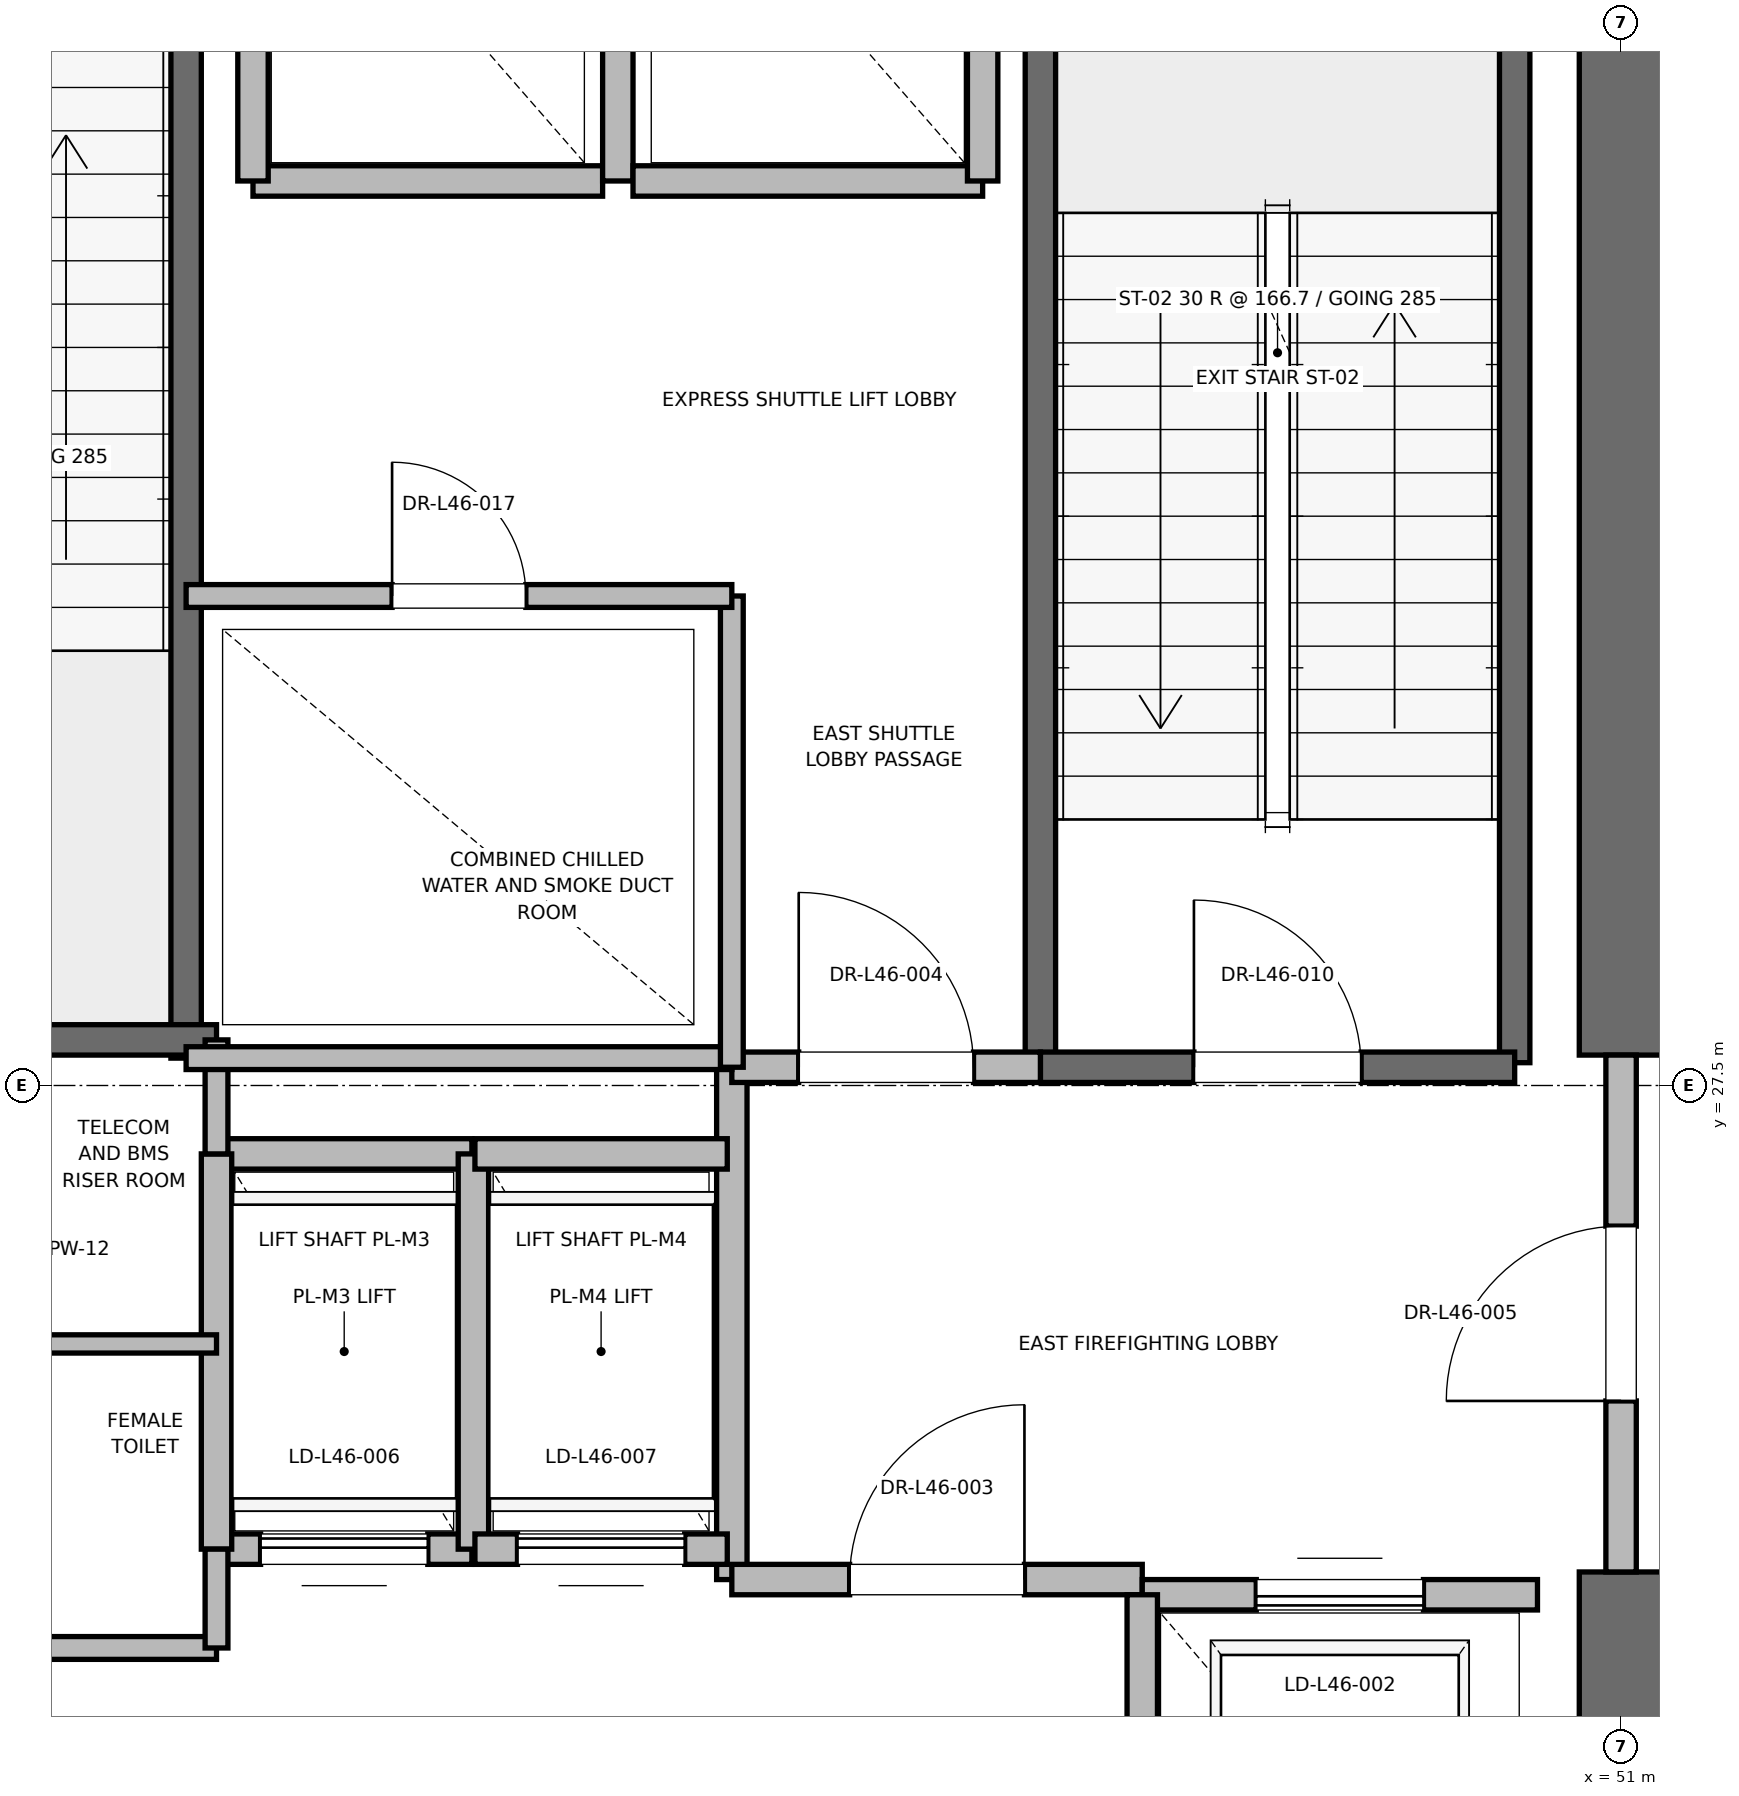
"""IFC4 building model, lengths in metres.
Left out: names, types, materials, properties, quantities, classifications, styles, units other than length and angle.
Written with IfcOpenShell. Run it as: python <this file> out.ifc"""

import sys

from ifc_helpers import new_model, si_unit, direction, frame, frame_2d, origin, place, context, subcontext, project, spatial, rectangle, extrude, element, fill, save


model = new_model("IFC4")
c1 = context("Model", 3, precision=1e-05, world=origin(), true_north=direction((0.0, 1.0)))
c2 = subcontext(c1, "Body", "Model", "MODEL_VIEW")
j1 = project(units=[si_unit("LENGTHUNIT", "METRE"), si_unit("PLANEANGLEUNIT", "RADIAN")], contexts=[c1])
p1 = place(None, origin())
s1 = spatial("IfcSite", under=j1, at=p1, CompositionType="ELEMENT")
p2 = place(p1, origin())
s2 = spatial("IfcBuilding", under=s1, at=p2, CompositionType="ELEMENT")
p3 = place(p2, frame((0.0, 0.0, 200.2)))
s3 = spatial("IfcBuildingStorey", under=s2, at=p3, CompositionType="ELEMENT", Elevation=200.2)
p4 = place(p3, frame((51.0, 18.5, 0.0), z_axis=(0.0, 0.0, 1.0), x_axis=(0.0, 1.0, 0.0)))
e1 = element("IfcWall", 1, at=p4, inside=s3, PredefinedType="SHEAR", context=c2, shape_type="SweptSolid", body=[
    extrude(rectangle(XDim=5.8, YDim=0.55, at=frame_2d((2.9, 0.0))), origin(), (0.0, 0.0, 1.0), 4.775),
])
p5 = place(p3, frame((51.0, 27.7, 0.0), z_axis=(0.0, 0.0, 1.0), x_axis=(0.0, 1.0, 0.0)))
e2 = element("IfcWall", 2, at=p5, inside=s3, PredefinedType="SHEAR", context=c2, shape_type="SweptSolid", body=[
    extrude(rectangle(XDim=8.8, YDim=0.55, at=frame_2d((4.4, 0.0))), origin(), (0.0, 0.0, 1.0), 4.775),
])
p6 = place(p3, frame((50.3, 27.65, 0.0), z_axis=(0.0, 0.0, 1.0), x_axis=(0.0, 1.0, 0.0)))
e3 = element("IfcWall", 3, at=p6, inside=s3, PredefinedType="SOLIDWALL", context=c2, shape_type="SweptSolid", body=[
    extrude(rectangle(XDim=8.15, YDim=0.2, at=frame_2d((4.075, 0.0))), origin(), (0.0, 0.0, 1.0), 4.775),
])
p7 = place(p3, frame((47.18, 27.62, 0.0), z_axis=(0.0, 0.0, 1.0), x_axis=(0.0, 1.0, 0.0)))
e4 = element("IfcWall", 4, at=p7, inside=s3, PredefinedType="SOLIDWALL", context=c2, shape_type="SweptSolid", body=[
    extrude(rectangle(XDim=8.18, YDim=0.2, at=frame_2d((4.09, 0.0))), origin(), (0.0, 0.0, 1.0), 4.775),
])
p8 = place(p3, frame((47.18, 27.62, 0.0), z_axis=(0.0, 0.0, 1.0), x_axis=(1.0, 0.0, 0.0)))
e5 = element("IfcWall", 5, at=p8, inside=s3, PredefinedType="SOLIDWALL", context=c2, shape_type="SweptSolid", body=[
    extrude(rectangle(XDim=3.12, YDim=0.2, at=frame_2d((1.56, 0.0))), origin(), (0.0, 0.0, 1.0), 4.775),
])
p9 = place(p8, frame((1.01, 0.0, 0.0)))
e6 = element("IfcOpeningElement", 6, at=p9, cuts=e5, PredefinedType="OPENING", context=c2, shape_type="SweptSolid", body=[
    extrude(rectangle(XDim=1.1, YDim=2.15, at=frame_2d((0.55, 1.075))), frame((0.0, 0.1, 0.0), z_axis=(0.0, -1.0, 0.0), x_axis=(1.0, 0.0, 0.0)), (0.0, 0.0, 1.0), 0.2),
])
p10 = place(p3, frame((41.56, 27.68, 0.0), z_axis=(0.0, 0.0, 1.0), x_axis=(0.0, 1.0, 0.0)))
e7 = element("IfcWall", 7, at=p10, inside=s3, PredefinedType="SOLIDWALL", context=c2, shape_type="SweptSolid", body=[
    extrude(rectangle(XDim=8.57, YDim=0.2, at=frame_2d((4.285, 0.0))), origin(), (0.0, 0.0, 1.0), 4.775),
])
p11 = place(p3, frame((38.44, 27.8, 0.0), z_axis=(0.0, 0.0, 1.0), x_axis=(1.0, 0.0, 0.0)))
e8 = element("IfcWall", 8, at=p11, inside=s3, PredefinedType="SOLIDWALL", context=c2, shape_type="SweptSolid", body=[
    extrude(rectangle(XDim=3.32, YDim=0.2, at=frame_2d((1.66, 0.0))), origin(), (0.0, 0.0, 1.0), 4.775),
])
p12 = place(p3, frame((45.15, 24.25, 0.0), z_axis=(0.0, 0.0, 1.0), x_axis=(0.0, 1.0, 0.0)))
e9 = element("IfcWall", 9, at=p12, inside=s3, PredefinedType="PARTITIONING", context=c2, shape_type="SweptSolid", body=[
    extrude(rectangle(XDim=3.37, YDim=0.2, at=frame_2d((1.685, 0.0))), origin(), (0.0, 0.0, 1.0), 4.775),
])
p13 = place(p3, frame((45.15, 24.25, 0.0), z_axis=(0.0, 0.0, 1.0), x_axis=(1.0, 0.0, 0.0)))
e10 = element("IfcWall", 10, at=p13, inside=s3, PredefinedType="PARTITIONING", context=c2, shape_type="SweptSolid", body=[
    extrude(rectangle(XDim=2.7, YDim=0.2, at=frame_2d((1.35, 0.0))), origin(), (0.0, 0.0, 1.0), 4.775),
])
p14 = place(p13, frame((0.775, 0.0, 0.0)))
e11 = element("IfcOpeningElement", 11, at=p14, cuts=e10, PredefinedType="OPENING", context=c2, shape_type="SweptSolid", body=[
    extrude(rectangle(XDim=1.15, YDim=2.2, at=frame_2d((0.575, 1.1))), frame((0.0, 0.1, 0.0), z_axis=(0.0, -1.0, 0.0), x_axis=(1.0, 0.0, 0.0)), (0.0, 0.0, 1.0), 0.2),
])
p15 = place(p3, frame((45.15, 27.62, 0.0), z_axis=(0.0, 0.0, 1.0), x_axis=(1.0, 0.0, 0.0)))
e12 = element("IfcWall", 12, at=p15, inside=s3, PredefinedType="PARTITIONING", context=c2, shape_type="SweptSolid", body=[
    extrude(rectangle(XDim=2.03, YDim=0.2, at=frame_2d((1.015, 0.0))), origin(), (0.0, 0.0, 1.0), 4.775),
])
p16 = place(p15, frame((0.44, 0.0, 0.0)))
e13 = element("IfcOpeningElement", 13, at=p16, cuts=e12, PredefinedType="OPENING", context=c2, shape_type="SweptSolid", body=[
    extrude(rectangle(XDim=1.15, YDim=2.2, at=frame_2d((0.575, 1.1))), frame((0.0, 0.1, 0.0), z_axis=(0.0, -1.0, 0.0), x_axis=(1.0, 0.0, 0.0)), (0.0, 0.0, 1.0), 0.2),
])
p17 = place(p3, frame((51.0, 24.3, 0.0), z_axis=(0.0, 0.0, 1.0), x_axis=(0.0, 1.0, 0.0)))
e14 = element("IfcWall", 14, at=p17, inside=s3, PredefinedType="PARTITIONING", context=c2, shape_type="SweptSolid", body=[
    extrude(rectangle(XDim=3.4, YDim=0.2, at=frame_2d((1.7, 0.0))), origin(), (0.0, 0.0, 1.0), 3.755),
])
p18 = place(p17, frame((1.125, 0.0, 0.0)))
e15 = element("IfcOpeningElement", 15, at=p18, cuts=e14, PredefinedType="OPENING", context=c2, shape_type="SweptSolid", body=[
    extrude(rectangle(XDim=1.15, YDim=2.2, at=frame_2d((0.575, 1.1))), frame((0.0, 0.1, 0.0), z_axis=(0.0, -1.0, 0.0), x_axis=(1.0, 0.0, 0.0)), (0.0, 0.0, 1.0), 0.2),
])
p19 = place(p3, frame((50.45, 24.15, 0.0), z_axis=(0.0, 0.0, 1.0), x_axis=(-1.0, 0.0, 0.0)))
e16 = element("IfcWall", 16, at=p19, inside=s3, PredefinedType="SOLIDWALL", context=c2, shape_type="SweptSolid", body=[
    extrude(rectangle(XDim=2.6, YDim=0.2, at=frame_2d((1.3, 0.0))), origin(), (0.0, 0.0, 1.0), 3.755),
])
p20 = place(p19, frame((0.75, 0.0, 0.0)))
e17 = element("IfcOpeningElement", 17, at=p20, cuts=e16, PredefinedType="OPENING", context=c2, shape_type="SweptSolid", body=[
    extrude(rectangle(XDim=1.1, YDim=2.2, at=frame_2d((0.55, 1.1))), frame((0.0, 0.1, 0.0), z_axis=(0.0, -1.0, 0.0), x_axis=(1.0, 0.0, 0.0)), (0.0, 0.0, 1.0), 0.2),
])
p21 = place(p3, frame((47.85, 24.15, 0.0), z_axis=(0.0, 0.0, 1.0), x_axis=(0.0, -1.0, 0.0)))
e18 = element("IfcWall", 18, at=p21, inside=s3, PredefinedType="SOLIDWALL", context=c2, shape_type="SweptSolid", body=[
    extrude(rectangle(XDim=3.0, YDim=0.2, at=frame_2d((1.5, 0.0))), origin(), (0.0, 0.0, 1.0), 4.775),
])
p22 = place(p3, frame((41.76, 24.45, 0.0), z_axis=(0.0, 0.0, 1.0), x_axis=(1.0, 0.0, 0.0)))
e19 = element("IfcWall", 19, at=p22, inside=s3, PredefinedType="SOLIDWALL", context=c2, shape_type="SweptSolid", body=[
    extrude(rectangle(XDim=1.68, YDim=0.2, at=frame_2d((0.84, 0.0))), origin(), (0.0, 0.0, 1.0), 4.775),
])
p23 = place(p22, frame((0.29, 0.0, 0.0)))
e20 = element("IfcOpeningElement", 20, at=p23, cuts=e19, PredefinedType="OPENING", context=c2, shape_type="SweptSolid", body=[
    extrude(rectangle(XDim=1.1, YDim=2.2, at=frame_2d((0.55, 1.1))), frame((0.0, 0.1, 0.0), z_axis=(0.0, -1.0, 0.0), x_axis=(1.0, 0.0, 0.0)), (0.0, 0.0, 1.0), 0.2),
])
p24 = place(p3, frame((43.44, 27.05, 0.0), z_axis=(0.0, 0.0, 1.0), x_axis=(-1.0, 0.0, 0.0)))
e21 = element("IfcWall", 21, at=p24, inside=s3, PredefinedType="SOLIDWALL", context=c2, shape_type="SweptSolid", body=[
    extrude(rectangle(XDim=1.68, YDim=0.2, at=frame_2d((0.84, 0.0))), origin(), (0.0, 0.0, 1.0), 4.775),
])
for number, where, z_axis, x_axis in (
    (22, (41.76, 27.05, 0.0), (0.0, 0.0, 1.0), (0.0, -1.0, 0.0)),
    (23, (43.45, 24.45, 0.0), (0.0, 0.0, 1.0), (0.0, 1.0, 0.0)),
):
    element("IfcWall", number, at=place(p3, frame(where, z_axis=z_axis, x_axis=x_axis)), inside=s3, PredefinedType="SOLIDWALL", context=c2, shape_type="SweptSolid", body=[
        extrude(rectangle(XDim=2.6, YDim=0.2, at=frame_2d((1.3, 0.0))), origin(), (0.0, 0.0, 1.0), 4.775),
    ])
p25 = place(p3, frame((43.46, 24.45, 0.0), z_axis=(0.0, 0.0, 1.0), x_axis=(1.0, 0.0, 0.0)))
e24 = element("IfcWall", 24, at=p25, inside=s3, PredefinedType="SOLIDWALL", context=c2, shape_type="SweptSolid", body=[
    extrude(rectangle(XDim=1.66, YDim=0.2, at=frame_2d((0.83, 0.0))), origin(), (0.0, 0.0, 1.0), 4.775),
])
p26 = place(p25, frame((0.28, 0.0, 0.0)))
e25 = element("IfcOpeningElement", 25, at=p26, cuts=e24, PredefinedType="OPENING", context=c2, shape_type="SweptSolid", body=[
    extrude(rectangle(XDim=1.1, YDim=2.2, at=frame_2d((0.55, 1.1))), frame((0.0, 0.1, 0.0), z_axis=(0.0, -1.0, 0.0), x_axis=(1.0, 0.0, 0.0)), (0.0, 0.0, 1.0), 0.2),
])
p27 = place(p3, frame((45.12, 27.05, 0.0), z_axis=(0.0, 0.0, 1.0), x_axis=(-1.0, 0.0, 0.0)))
e26 = element("IfcWall", 26, at=p27, inside=s3, PredefinedType="SOLIDWALL", context=c2, shape_type="SweptSolid", body=[
    extrude(rectangle(XDim=1.66, YDim=0.2, at=frame_2d((0.83, 0.0))), origin(), (0.0, 0.0, 1.0), 4.775),
])
p28 = place(p3, frame((42.0, 33.45, 0.0), z_axis=(0.0, 0.0, 1.0), x_axis=(1.0, 0.0, 0.0)))
e27 = element("IfcWall", 27, at=p28, inside=s3, PredefinedType="SOLIDWALL", context=c2, shape_type="SweptSolid", body=[
    extrude(rectangle(XDim=2.3, YDim=0.2, at=frame_2d((1.15, 0.0))), origin(), (0.0, 0.0, 1.0), 4.775),
])
for number, where, z_axis, x_axis in (
    (28, (42.0, 36.05, 0.0), (0.0, 0.0, 1.0), (0.0, -1.0, 0.0)),
    (29, (44.4, 33.45, 0.0), (0.0, 0.0, 1.0), (0.0, 1.0, 0.0)),
):
    element("IfcWall", number, at=place(p3, frame(where, z_axis=z_axis, x_axis=x_axis)), inside=s3, PredefinedType="SOLIDWALL", context=c2, shape_type="SweptSolid", body=[
        extrude(rectangle(XDim=2.6, YDim=0.2, at=frame_2d((1.3, 0.0))), origin(), (0.0, 0.0, 1.0), 3.755),
    ])
p29 = place(p3, frame((44.5, 33.45, 0.0), z_axis=(0.0, 0.0, 1.0), x_axis=(1.0, 0.0, 0.0)))
e30 = element("IfcWall", 30, at=p29, inside=s3, PredefinedType="SOLIDWALL", context=c2, shape_type="SweptSolid", body=[
    extrude(rectangle(XDim=2.3, YDim=0.2, at=frame_2d((1.15, 0.0))), origin(), (0.0, 0.0, 1.0), 4.775),
])
p30 = place(p3, frame((46.8, 33.45, 0.0), z_axis=(0.0, 0.0, 1.0), x_axis=(0.0, 1.0, 0.0)))
e31 = element("IfcWall", 31, at=p30, inside=s3, PredefinedType="SOLIDWALL", context=c2, shape_type="SweptSolid", body=[
    extrude(rectangle(XDim=2.6, YDim=0.2, at=frame_2d((1.3, 0.0))), origin(), (0.0, 0.0, 1.0), 4.775),
])
p31 = place(p3, frame((39.95, 23.8, 0.0), z_axis=(0.0, 0.0, 1.0), x_axis=(1.0, 0.0, 0.0)))
e32 = element("IfcWall", 32, at=p31, inside=s3, PredefinedType="PARTITIONING", context=c2, shape_type="SweptSolid", body=[
    extrude(rectangle(XDim=1.81, YDim=0.15, at=frame_2d((0.905, 0.0))), origin(), (0.0, 0.0, 1.0), 2.85),
])
p32 = place(p3, frame((39.95, 25.8, 0.0), z_axis=(0.0, 0.0, 1.0), x_axis=(1.0, 0.0, 0.0)))
e33 = element("IfcWall", 33, at=p32, inside=s3, PredefinedType="PARTITIONING", context=c2, shape_type="SweptSolid", body=[
    extrude(rectangle(XDim=1.81, YDim=0.12, at=frame_2d((0.905, 0.0))), origin(), (0.0, 0.0, 1.0), 2.85),
])
p33 = place(p3, frame((41.76, 23.8, 0.0), z_axis=(0.0, 0.0, 1.0), x_axis=(0.0, 1.0, 0.0)))
e34 = element("IfcWall", 34, at=p33, inside=s3, PredefinedType="PARTITIONING", context=c2, shape_type="SweptSolid", body=[
    extrude(rectangle(XDim=0.65, YDim=0.15, at=frame_2d((0.325, 0.0))), origin(), (0.0, 0.0, 1.0), 2.85),
])
p34 = place(p3, frame((41.76, 27.05, 0.0), z_axis=(0.0, 0.0, 1.0), x_axis=(0.0, 1.0, 0.0)))
e35 = element("IfcWall", 35, at=p34, inside=s3, PredefinedType="PARTITIONING", context=c2, shape_type="SweptSolid", body=[
    extrude(rectangle(XDim=0.75, YDim=0.15, at=frame_2d((0.375, 0.0))), origin(), (0.0, 0.0, 1.0), 2.85),
])
p35 = place(p3, frame((41.56, 27.68, 0.0), z_axis=(0.0, 0.0, 1.0), x_axis=(1.0, 0.0, 0.0)))
e36 = element("IfcWall", 36, at=p35, inside=s3, PredefinedType="PARTITIONING", context=c2, shape_type="SweptSolid", body=[
    extrude(rectangle(XDim=3.59, YDim=0.15, at=frame_2d((1.795, 0.0))), origin(), (0.0, 0.0, 1.0), 2.85),
])
p36 = place(p3, frame((45.15, 27.62, 0.0), z_axis=(0.0, 0.0, 1.0), x_axis=(0.0, 1.0, 0.0)))
e37 = element("IfcWall", 37, at=p36, inside=s3, PredefinedType="PARTITIONING", context=c2, shape_type="SweptSolid", body=[
    extrude(rectangle(XDim=3.1, YDim=0.15, at=frame_2d((1.55, 0.0))), origin(), (0.0, 0.0, 1.0), 2.85),
])
p37 = place(p3, frame((41.56, 30.72, 0.0), z_axis=(0.0, 0.0, 1.0), x_axis=(1.0, 0.0, 0.0)))
e38 = element("IfcWall", 38, at=p37, inside=s3, PredefinedType="PARTITIONING", context=c2, shape_type="SweptSolid", body=[
    extrude(rectangle(XDim=3.59, YDim=0.15, at=frame_2d((1.795, 0.0))), origin(), (0.0, 0.0, 1.0), 2.85),
])
p38 = place(p37, frame((1.355, 0.0, 0.0)))
e39 = element("IfcOpeningElement", 39, at=p38, cuts=e38, PredefinedType="OPENING", context=c2, shape_type="SweptSolid", body=[
    extrude(rectangle(XDim=0.88, YDim=2.1, at=frame_2d((0.44, 1.05))), frame((0.0, 0.075, 0.0), z_axis=(0.0, -1.0, 0.0), x_axis=(1.0, 0.0, 0.0)), (0.0, 0.0, 1.0), 0.15),
])
p39 = place(p9, origin())
e40 = element("IfcDoor", 40, at=p39, inside=s3, OperationType="SINGLE_SWING_LEFT", PredefinedType="DOOR", context=c2, shape_type="SweptSolid", body=[
    extrude(rectangle(XDim=1.1, YDim=2.15, at=frame_2d((0.55, 1.075))), frame((0.0, 0.025, 0.0), z_axis=(0.0, -1.0, 0.0), x_axis=(1.0, 0.0, 0.0)), (0.0, 0.0, 1.0), 0.05),
])
fill(e6, e40)
p40 = place(p14, origin())
e41 = element("IfcDoor", 41, at=p40, inside=s3, OperationType="SINGLE_SWING_RIGHT", PredefinedType="DOOR", context=c2, shape_type="SweptSolid", body=[
    extrude(rectangle(XDim=1.15, YDim=2.2, at=frame_2d((0.575, 1.1))), frame((0.0, 0.025, 0.0), z_axis=(0.0, -1.0, 0.0), x_axis=(1.0, 0.0, 0.0)), (0.0, 0.0, 1.0), 0.05),
])
fill(e11, e41)
p41 = place(p16, origin())
e42 = element("IfcDoor", 42, at=p41, inside=s3, OperationType="SINGLE_SWING_LEFT", PredefinedType="DOOR", context=c2, shape_type="SweptSolid", body=[
    extrude(rectangle(XDim=1.15, YDim=2.2, at=frame_2d((0.575, 1.1))), frame((0.0, 0.025, 0.0), z_axis=(0.0, -1.0, 0.0), x_axis=(1.0, 0.0, 0.0)), (0.0, 0.0, 1.0), 0.05),
])
fill(e13, e42)
p42 = place(p18, origin())
e43 = element("IfcDoor", 43, at=p42, inside=s3, OperationType="SINGLE_SWING_LEFT", PredefinedType="DOOR", context=c2, shape_type="SweptSolid", body=[
    extrude(rectangle(XDim=1.15, YDim=2.2, at=frame_2d((0.575, 1.1))), frame((0.0, 0.025, 0.0), z_axis=(0.0, -1.0, 0.0), x_axis=(1.0, 0.0, 0.0)), (0.0, 0.0, 1.0), 0.05),
])
fill(e15, e43)
p43 = place(p20, origin())
e44 = element("IfcDoor", 44, at=p43, inside=s3, OperationType="SLIDING_TO_RIGHT", PredefinedType="DOOR", context=c2, shape_type="SweptSolid", body=[
    extrude(rectangle(XDim=1.1, YDim=2.2, at=frame_2d((0.55, 1.1))), frame((0.0, 0.025, 0.0), z_axis=(0.0, -1.0, 0.0), x_axis=(1.0, 0.0, 0.0)), (0.0, 0.0, 1.0), 0.05),
])
fill(e17, e44)
p44 = place(p23, origin())
e45 = element("IfcDoor", 45, at=p44, inside=s3, OperationType="SLIDING_TO_RIGHT", PredefinedType="DOOR", context=c2, shape_type="SweptSolid", body=[
    extrude(rectangle(XDim=1.1, YDim=2.2, at=frame_2d((0.55, 1.1))), frame((0.0, 0.025, 0.0), z_axis=(0.0, -1.0, 0.0), x_axis=(1.0, 0.0, 0.0)), (0.0, 0.0, 1.0), 0.05),
])
fill(e20, e45)
p45 = place(p26, origin())
e46 = element("IfcDoor", 46, at=p45, inside=s3, OperationType="SLIDING_TO_RIGHT", PredefinedType="DOOR", context=c2, shape_type="SweptSolid", body=[
    extrude(rectangle(XDim=1.1, YDim=2.2, at=frame_2d((0.55, 1.1))), frame((0.0, 0.025, 0.0), z_axis=(0.0, -1.0, 0.0), x_axis=(1.0, 0.0, 0.0)), (0.0, 0.0, 1.0), 0.05),
])
fill(e25, e46)
p46 = place(p38, origin())
e47 = element("IfcDoor", 47, at=p46, inside=s3, OperationType="SINGLE_SWING_LEFT", PredefinedType="DOOR", context=c2, shape_type="SweptSolid", body=[
    extrude(rectangle(XDim=0.88, YDim=2.1, at=frame_2d((0.44, 1.05))), frame((0.0, 0.025, 0.0), z_axis=(0.0, -1.0, 0.0), x_axis=(1.0, 0.0, 0.0)), (0.0, 0.0, 1.0), 0.05),
])
fill(e39, e47)
save(model, sys.argv[1])
